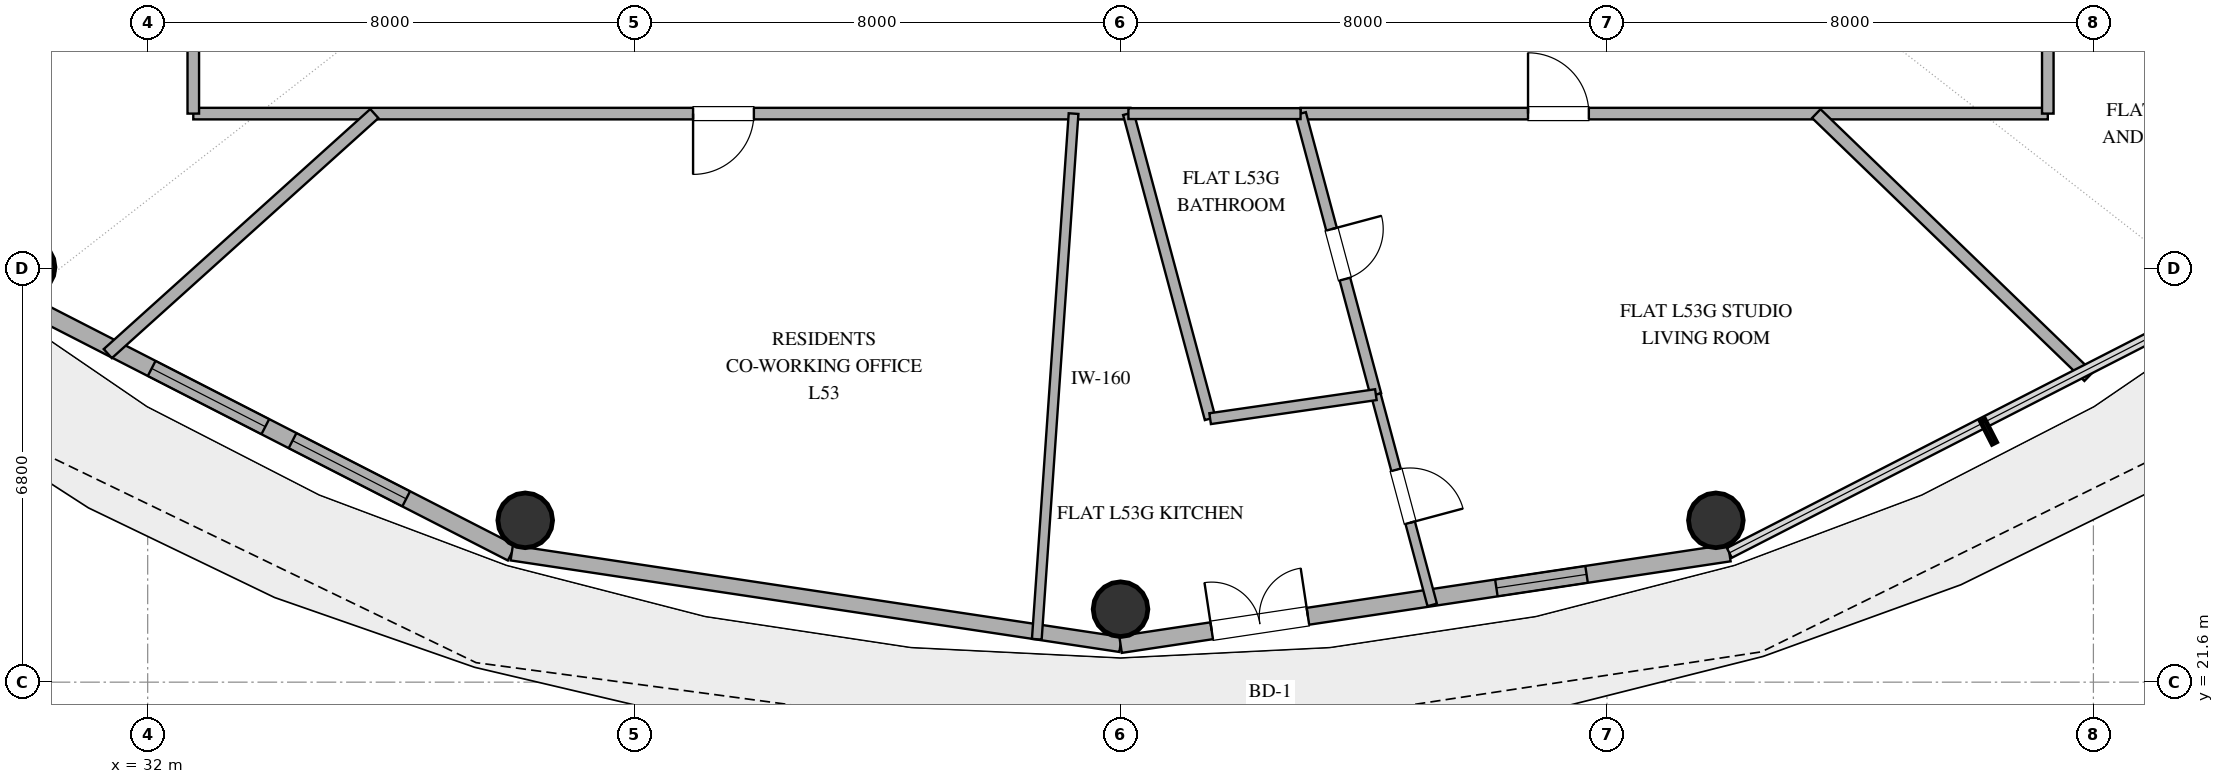
"""IFC4 building model, lengths in metres.
Left out: names, types, materials, properties, quantities, classifications, styles, units other than length and angle.
Written with IfcOpenShell. Run it as: python <this file> out.ifc"""

import sys

from ifc_helpers import new_model, si_unit, direction, frame, frame_2d, origin, origin_2d, place, context, subcontext, project, spatial, rectangle, hollow_circle, extrude, element, fill, save


model = new_model("IFC4")
c1 = context("Model", 3, precision=1e-05, world=origin(), true_north=direction((0.0, 1.0)))
c2 = subcontext(c1, "Body", "Model", "MODEL_VIEW")
j1 = project(units=[si_unit("LENGTHUNIT", "METRE"), si_unit("PLANEANGLEUNIT", "RADIAN")], contexts=[c1])
p1 = place(None, origin())
s1 = spatial("IfcSite", under=j1, at=p1, CompositionType="ELEMENT")
p2 = place(p1, origin())
s2 = spatial("IfcBuilding", under=s1, at=p2, CompositionType="ELEMENT")
p3 = place(p2, frame((0.0, 0.0, 210.0)))
s3 = spatial("IfcBuildingStorey", under=s2, at=p3, CompositionType="ELEMENT", Elevation=210.0)
for number, where, z_axis, x_axis in (
    (1, (30.025, 28.424, 0.0), (0.0, 0.0, 1.0), (1.0, 0.0, 0.0)),
    (2, (38.209, 24.261, 0.0), (0.0, 0.0, 1.0), (1.0, 0.0, 0.0)),
    (3, (48.0, 22.8, 0.0), (0.0, 0.0, 1.0), (1.0, 0.0, 0.0)),
    (4, (57.791, 24.261, 0.0), (0.0, 0.0, 1.0), (1.0, 0.0, 0.0)),
):
    element("IfcColumn", number, at=place(p3, frame(where, z_axis=z_axis, x_axis=x_axis)), inside=s3, PredefinedType="COLUMN", context=c2, shape_type="SweptSolid", body=[
        extrude(hollow_circle(Radius=0.45, WallThickness=0.025, at=origin_2d()), origin(), (0.0, 0.0, 1.0), 3.36),
    ])
p4 = place(p3, frame((29.617, 28.013, 0.0), z_axis=(0.0, 0.0, 1.0), x_axis=(0.890007394051, -0.455946091699, 0.0)))
e5 = element("IfcWall", 5, at=p4, inside=s3, PredefinedType="SOLIDWALL", context=c2, shape_type="SweptSolid", body=[
    extrude(rectangle(XDim=9.404, YDim=0.28, at=frame_2d((4.702, 0.0))), origin(), (0.0, 0.0, 1.0), 3.36),
])
p5 = place(p4, frame((2.751, 0.0, 0.85)))
e6 = element("IfcOpeningElement", 6, at=p5, cuts=e5, PredefinedType="OPENING", context=c2, shape_type="SweptSolid", body=[
    extrude(rectangle(XDim=2.1, YDim=2.2, at=frame_2d((1.05, 1.1))), frame((0.0, 0.15, 0.0), z_axis=(0.0, -1.0, 0.0), x_axis=(1.0, 0.0, 0.0)), (0.0, 0.0, 1.0), 0.3),
])
p6 = place(p4, frame((5.354, 0.0, 0.85)))
e7 = element("IfcOpeningElement", 7, at=p6, cuts=e5, PredefinedType="OPENING", context=c2, shape_type="SweptSolid", body=[
    extrude(rectangle(XDim=2.1, YDim=2.2, at=frame_2d((1.05, 1.1))), frame((0.0, 0.15, 0.0), z_axis=(0.0, -1.0, 0.0), x_axis=(1.0, 0.0, 0.0)), (0.0, 0.0, 1.0), 0.3),
])
p7 = place(p3, frame((37.987, 23.726, 0.0), z_axis=(0.0, 0.0, 1.0), x_axis=(0.988882522213, -0.148698881169, 0.0)))
e8 = element("IfcWall", 8, at=p7, inside=s3, PredefinedType="SOLIDWALL", context=c2, shape_type="SweptSolid", body=[
    extrude(rectangle(XDim=10.125, YDim=0.25, at=frame_2d((5.062, 0.0))), origin(), (0.0, 0.0, 1.0), 3.36),
])
p8 = place(p3, frame((48.0, 22.22, 0.0), z_axis=(0.0, 0.0, 1.0), x_axis=(0.988882522213, 0.148698881169, 0.0)))
e9 = element("IfcWall", 9, at=p8, inside=s3, PredefinedType="SOLIDWALL", context=c2, shape_type="SweptSolid", body=[
    extrude(rectangle(XDim=10.125, YDim=0.28, at=frame_2d((5.062, 0.0))), origin(), (0.0, 0.0, 1.0), 3.36),
])
p9 = place(p8, frame((1.516, 0.0, 0.0)))
e10 = element("IfcOpeningElement", 10, at=p9, cuts=e9, PredefinedType="OPENING", context=c2, shape_type="SweptSolid", body=[
    extrude(rectangle(XDim=1.6, YDim=2.25, at=frame_2d((0.8, 1.125))), frame((0.0, 0.15, 0.0), z_axis=(0.0, -1.0, 0.0), x_axis=(1.0, 0.0, 0.0)), (0.0, 0.0, 1.0), 0.3),
])
p10 = place(p8, frame((6.25, 0.0, 0.85)))
e11 = element("IfcOpeningElement", 11, at=p10, cuts=e9, PredefinedType="OPENING", context=c2, shape_type="SweptSolid", body=[
    extrude(rectangle(XDim=1.5, YDim=2.0, at=frame_2d((0.75, 1.0))), frame((0.0, 0.15, 0.0), z_axis=(0.0, -1.0, 0.0), x_axis=(1.0, 0.0, 0.0)), (0.0, 0.0, 1.0), 0.3),
])
p11 = place(p3, frame((48.162, 30.95, 0.0), z_axis=(0.0, 0.0, 1.0), x_axis=(-1.0, 0.0, 0.0)))
e12 = element("IfcWall", 12, at=p11, inside=s3, PredefinedType="PARTITIONING", context=c2, shape_type="SweptSolid", body=[
    extrude(rectangle(XDim=15.412, YDim=0.19, at=frame_2d((7.706, 0.0))), origin(), (0.0, 0.0, 1.0), 2.72),
])
p12 = place(p11, frame((6.193, 0.0, 0.0)))
e13 = element("IfcOpeningElement", 13, at=p12, cuts=e12, PredefinedType="OPENING", context=c2, shape_type="SweptSolid", body=[
    extrude(rectangle(XDim=1.0, YDim=2.2, at=frame_2d((0.5, 1.1))), frame((0.0, 0.105, 0.0), z_axis=(0.0, -1.0, 0.0), x_axis=(1.0, 0.0, 0.0)), (0.0, 0.0, 1.0), 0.21),
])
p13 = place(p3, frame((47.227, 30.95, 0.0), z_axis=(0.0, 0.0, 1.0), x_axis=(-0.069763237321, -0.997563577281, 0.0)))
e14 = element("IfcWall", 14, at=p13, inside=s3, PredefinedType="PLUMBINGWALL", context=c2, shape_type="SweptSolid", body=[
    extrude(rectangle(XDim=8.665, YDim=0.16, at=frame_2d((4.333, 0.0))), origin(), (0.0, 0.0, 1.0), 2.72),
])
p14 = place(p3, frame((50.961, 30.95, 0.0), z_axis=(0.0, 0.0, 1.0), x_axis=(1.0, 0.0, 0.0)))
e15 = element("IfcWall", 15, at=p14, inside=s3, PredefinedType="PARTITIONING", context=c2, shape_type="SweptSolid", body=[
    extrude(rectangle(XDim=12.289, YDim=0.19, at=frame_2d((6.145, 0.0))), origin(), (0.0, 0.0, 1.0), 2.72),
])
p15 = place(p14, frame((3.741, 0.0, 0.0)))
e16 = element("IfcOpeningElement", 16, at=p15, cuts=e15, PredefinedType="OPENING", context=c2, shape_type="SweptSolid", body=[
    extrude(rectangle(XDim=1.0, YDim=2.2, at=frame_2d((0.5, 1.1))), frame((0.0, 0.105, 0.0), z_axis=(0.0, -1.0, 0.0), x_axis=(1.0, 0.0, 0.0)), (0.0, 0.0, 1.0), 0.21),
])
p16 = place(p3, frame((32.75, 30.95, 0.0), z_axis=(0.0, 0.0, 1.0), x_axis=(0.0, 1.0, 0.0)))
e17 = element("IfcWall", 17, at=p16, inside=s3, PredefinedType="PARTITIONING", context=c2, shape_type="SweptSolid", body=[
    extrude(rectangle(XDim=12.148, YDim=0.19, at=frame_2d((6.074, 0.0))), origin(), (0.0, 0.0, 1.0), 2.72),
])
p17 = place(p16, frame((3.214, 0.0, 0.0)))
e18 = element("IfcOpeningElement", 18, at=p17, cuts=e17, PredefinedType="OPENING", context=c2, shape_type="SweptSolid", body=[
    extrude(rectangle(XDim=1.0, YDim=2.2, at=frame_2d((0.5, 1.1))), frame((0.0, 0.105, 0.0), z_axis=(0.0, -1.0, 0.0), x_axis=(1.0, 0.0, 0.0)), (0.0, 0.0, 1.0), 0.21),
])
p18 = place(p3, frame((63.921, 26.625, 0.0), z_axis=(0.0, 0.0, 1.0), x_axis=(-0.719350784266, 0.69464699609, 0.0)))
e19 = element("IfcWall", 19, at=p18, inside=s3, PredefinedType="PARTITIONING", context=c2, shape_type="SweptSolid", body=[
    extrude(rectangle(XDim=6.226, YDim=0.2, at=frame_2d((3.113, 0.0))), origin(), (0.0, 0.0, 1.0), 2.72),
])
p19 = place(p3, frame((63.25, 45.419, 0.0), z_axis=(0.0, 0.0, 1.0), x_axis=(0.0, -1.0, 0.0)))
e20 = element("IfcWall", 20, at=p19, inside=s3, PredefinedType="PARTITIONING", context=c2, shape_type="SweptSolid", body=[
    extrude(rectangle(XDim=14.469, YDim=0.19, at=frame_2d((7.235, 0.0))), origin(), (0.0, 0.0, 1.0), 2.72),
])
p20 = place(p19, frame((10.905, 0.0, 0.0)))
e21 = element("IfcOpeningElement", 21, at=p20, cuts=e20, PredefinedType="OPENING", context=c2, shape_type="SweptSolid", body=[
    extrude(rectangle(XDim=1.0, YDim=2.2, at=frame_2d((0.5, 1.1))), frame((0.0, 0.105, 0.0), z_axis=(0.0, -1.0, 0.0), x_axis=(1.0, 0.0, 0.0)), (0.0, 0.0, 1.0), 0.21),
])
p21 = place(p3, frame((35.728, 30.95, 0.0), z_axis=(0.0, 0.0, 1.0), x_axis=(-0.743158305959, -0.669115634464, 0.0)))
e22 = element("IfcWall", 22, at=p21, inside=s3, PredefinedType="PARTITIONING", context=c2, shape_type="SweptSolid", body=[
    extrude(rectangle(XDim=5.899, YDim=0.2, at=frame_2d((2.949, 0.0))), origin(), (0.0, 0.0, 1.0), 2.72),
])
p22 = place(p3, frame((49.473, 25.933, 0.0), z_axis=(0.0, 0.0, 1.0), x_axis=(-0.258826939486, 0.965923710961, 0.0)))
e23 = element("IfcWall", 23, at=p22, inside=s3, PredefinedType="PLUMBINGWALL", context=c2, shape_type="SweptSolid", body=[
    extrude(rectangle(XDim=5.194, YDim=0.18, at=frame_2d((2.597, 0.0))), origin(), (0.0, 0.0, 1.0), 2.72),
])
p23 = place(p3, frame((50.961, 30.95, 0.0), z_axis=(0.0, 0.0, 1.0), x_axis=(0.258827893949, -0.965923455204, 0.0)))
e24 = element("IfcWall", 24, at=p23, inside=s3, PredefinedType="PLUMBINGWALL", context=c2, shape_type="SweptSolid", body=[
    extrude(rectangle(XDim=4.785, YDim=0.18, at=frame_2d((2.393, 0.0))), origin(), (0.0, 0.0, 1.0), 2.72),
])
p24 = place(p23, frame((1.968, 0.0, 0.0)))
e25 = element("IfcOpeningElement", 25, at=p24, cuts=e24, PredefinedType="OPENING", context=c2, shape_type="SweptSolid", body=[
    extrude(rectangle(XDim=0.85, YDim=2.1, at=frame_2d((0.425, 1.05))), frame((0.0, 0.1, 0.0), z_axis=(0.0, -1.0, 0.0), x_axis=(1.0, 0.0, 0.0)), (0.0, 0.0, 1.0), 0.2),
])
p25 = place(p3, frame((52.199, 26.328, 0.0), z_axis=(0.0, 0.0, 1.0), x_axis=(0.258821309613, -0.965925219512, 0.0)))
e26 = element("IfcWall", 26, at=p25, inside=s3, PredefinedType="PLUMBINGWALL", context=c2, shape_type="SweptSolid", body=[
    extrude(rectangle(XDim=3.58, YDim=0.16, at=frame_2d((1.79, 0.0))), origin(), (0.0, 0.0, 1.0), 2.72),
])
p26 = place(p25, frame((1.28, 0.0, 0.0)))
e27 = element("IfcOpeningElement", 27, at=p26, cuts=e26, PredefinedType="OPENING", context=c2, shape_type="SweptSolid", body=[
    extrude(rectangle(XDim=0.9, YDim=2.1, at=frame_2d((0.45, 1.05))), frame((0.0, 0.09, 0.0), z_axis=(0.0, -1.0, 0.0), x_axis=(1.0, 0.0, 0.0)), (0.0, 0.0, 1.0), 0.18),
])
p27 = place(p3, frame((48.129, 30.95, 0.0), z_axis=(0.0, 0.0, 1.0), x_axis=(1.0, 0.0, 0.0)))
e28 = element("IfcWall", 28, at=p27, inside=s3, PredefinedType="PLUMBINGWALL", context=c2, shape_type="SweptSolid", body=[
    extrude(rectangle(XDim=2.832, YDim=0.18, at=frame_2d((1.416, 0.0))), origin(), (0.0, 0.0, 1.0), 2.72),
])
p28 = place(p3, frame((52.199, 26.328, 0.0), z_axis=(0.0, 0.0, 1.0), x_axis=(-0.989687205531, -0.143245367142, 0.0)))
e29 = element("IfcWall", 29, at=p28, inside=s3, PredefinedType="PLUMBINGWALL", context=c2, shape_type="SweptSolid", body=[
    extrude(rectangle(XDim=2.754, YDim=0.18, at=frame_2d((1.377, 0.0))), origin(), (0.0, 0.0, 1.0), 2.72),
])
p29 = place(p5, origin())
e30 = element("IfcWindow", 30, at=p29, inside=s3, PartitioningType="SINGLE_PANEL", PredefinedType="WINDOW", context=c2, shape_type="SweptSolid", body=[
    extrude(rectangle(XDim=2.1, YDim=2.2, at=frame_2d((1.05, 1.1))), frame((0.0, 0.03, 0.0), z_axis=(0.0, -1.0, 0.0), x_axis=(1.0, 0.0, 0.0)), (0.0, 0.0, 1.0), 0.06),
])
fill(e6, e30)
p30 = place(p6, origin())
e31 = element("IfcWindow", 31, at=p30, inside=s3, PartitioningType="SINGLE_PANEL", PredefinedType="WINDOW", context=c2, shape_type="SweptSolid", body=[
    extrude(rectangle(XDim=2.1, YDim=2.2, at=frame_2d((1.05, 1.1))), frame((0.0, 0.03, 0.0), z_axis=(0.0, -1.0, 0.0), x_axis=(1.0, 0.0, 0.0)), (0.0, 0.0, 1.0), 0.06),
])
fill(e7, e31)
p31 = place(p9, origin())
e32 = element("IfcDoor", 32, at=p31, inside=s3, OperationType="DOUBLE_DOOR_SINGLE_SWING", PredefinedType="DOOR", context=c2, shape_type="SweptSolid", body=[
    extrude(rectangle(XDim=1.6, YDim=2.25, at=frame_2d((0.8, 1.125))), frame((0.0, 0.025, 0.0), z_axis=(0.0, -1.0, 0.0), x_axis=(1.0, 0.0, 0.0)), (0.0, 0.0, 1.0), 0.05),
])
fill(e10, e32)
p32 = place(p10, origin())
e33 = element("IfcWindow", 33, at=p32, inside=s3, PartitioningType="SINGLE_PANEL", PredefinedType="WINDOW", context=c2, shape_type="SweptSolid", body=[
    extrude(rectangle(XDim=1.5, YDim=2.0, at=frame_2d((0.75, 1.0))), frame((0.0, 0.03, 0.0), z_axis=(0.0, -1.0, 0.0), x_axis=(1.0, 0.0, 0.0)), (0.0, 0.0, 1.0), 0.06),
])
fill(e11, e33)
p33 = place(p12, origin())
e34 = element("IfcDoor", 34, at=p33, inside=s3, OperationType="SINGLE_SWING_RIGHT", PredefinedType="DOOR", context=c2, shape_type="SweptSolid", body=[
    extrude(rectangle(XDim=1.0, YDim=2.2, at=frame_2d((0.5, 1.1))), frame((0.0, 0.025, 0.0), z_axis=(0.0, -1.0, 0.0), x_axis=(1.0, 0.0, 0.0)), (0.0, 0.0, 1.0), 0.05),
])
fill(e13, e34)
p34 = place(p15, origin())
e35 = element("IfcDoor", 35, at=p34, inside=s3, OperationType="SINGLE_SWING_LEFT", PredefinedType="DOOR", context=c2, shape_type="SweptSolid", body=[
    extrude(rectangle(XDim=1.0, YDim=2.2, at=frame_2d((0.5, 1.1))), frame((0.0, 0.025, 0.0), z_axis=(0.0, -1.0, 0.0), x_axis=(1.0, 0.0, 0.0)), (0.0, 0.0, 1.0), 0.05),
])
fill(e16, e35)
p35 = place(p24, origin())
e36 = element("IfcDoor", 36, at=p35, inside=s3, OperationType="SINGLE_SWING_LEFT", PredefinedType="DOOR", context=c2, shape_type="SweptSolid", body=[
    extrude(rectangle(XDim=0.85, YDim=2.1, at=frame_2d((0.425, 1.05))), frame((0.0, 0.025, 0.0), z_axis=(0.0, -1.0, 0.0), x_axis=(1.0, 0.0, 0.0)), (0.0, 0.0, 1.0), 0.05),
])
fill(e25, e36)
p36 = place(p26, origin())
e37 = element("IfcDoor", 37, at=p36, inside=s3, OperationType="SINGLE_SWING_RIGHT", PredefinedType="DOOR", context=c2, shape_type="SweptSolid", body=[
    extrude(rectangle(XDim=0.9, YDim=2.1, at=frame_2d((0.45, 1.05))), frame((0.0, 0.025, 0.0), z_axis=(0.0, -1.0, 0.0), x_axis=(1.0, 0.0, 0.0)), (0.0, 0.0, 1.0), 0.05),
])
fill(e27, e37)
save(model, sys.argv[1])
